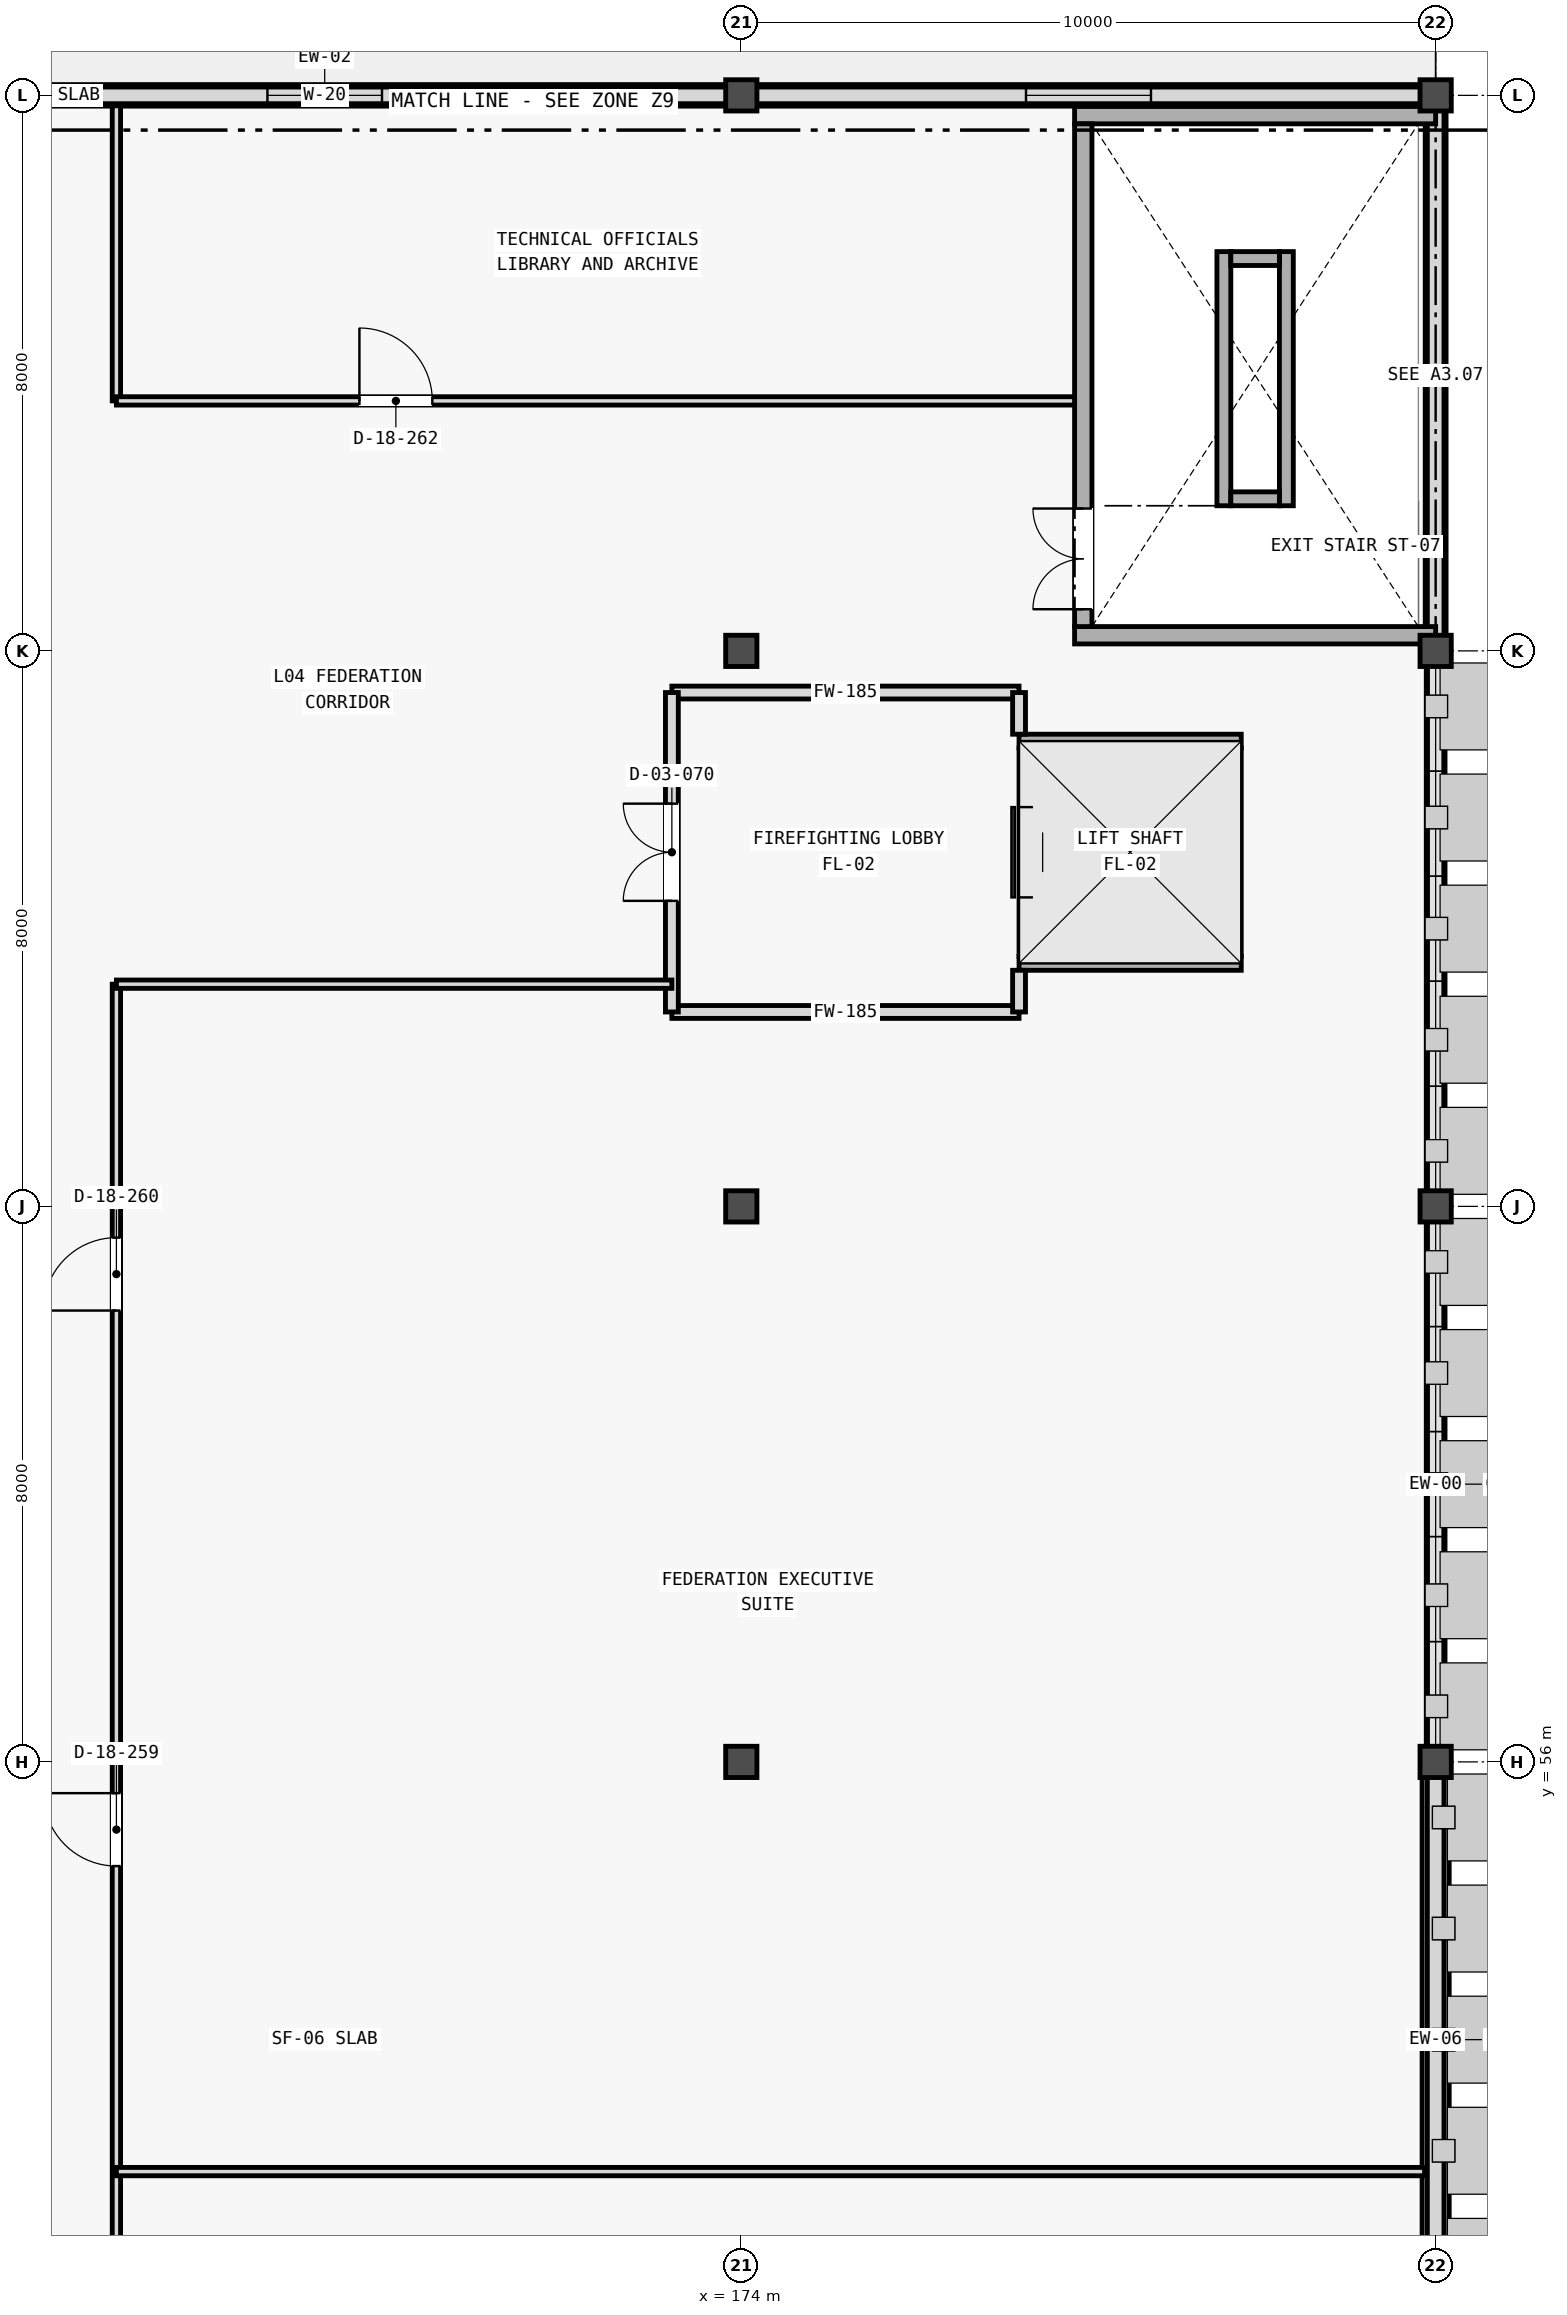
"""IFC4 building model, lengths in metres.
Left out: names, types, materials, properties, quantities, classifications, styles, units other than length and angle.
Written with IfcOpenShell. Run it as: python <this file> out.ifc"""

import sys

from ifc_helpers import new_model, si_unit, direction, frame, frame_2d, origin, origin_2d, place, context, subcontext, project, spatial, rectangle, extrude, element, fill, save


model = new_model("IFC4")
c1 = context("Model", 3, precision=1e-05, world=origin(), true_north=direction((0.0, 1.0)))
c2 = subcontext(c1, "Body", "Model", "MODEL_VIEW")
j1 = project(units=[si_unit("LENGTHUNIT", "METRE"), si_unit("PLANEANGLEUNIT", "RADIAN")], contexts=[c1])
p1 = place(None, origin())
s1 = spatial("IfcSite", under=j1, at=p1, CompositionType="ELEMENT")
p2 = place(p1, origin())
s2 = spatial("IfcBuilding", under=s1, at=p2, CompositionType="ELEMENT")
p3 = place(p2, frame((0.0, 0.0, 18.6)))
s3 = spatial("IfcBuildingStorey", under=s2, at=p3, CompositionType="ELEMENT", Elevation=18.6)
for number, where, z_axis, x_axis in (
    (1, (174.0, 56.0, 0.0), (0.0, 0.0, 1.0), (1.0, 0.0, 0.0)),
    (2, (184.0, 56.0, 0.0), (0.0, 0.0, 1.0), (1.0, 0.0, 0.0)),
    (3, (174.0, 64.0, 0.0), (0.0, 0.0, 1.0), (1.0, 0.0, 0.0)),
    (4, (184.0, 64.0, 0.0), (0.0, 0.0, 1.0), (1.0, 0.0, 0.0)),
    (5, (174.0, 72.0, 0.0), (0.0, 0.0, 1.0), (1.0, 0.0, 0.0)),
    (6, (184.0, 72.0, 0.0), (0.0, 0.0, 1.0), (1.0, 0.0, 0.0)),
    (7, (174.0, 80.0, 0.0), (0.0, 0.0, 1.0), (1.0, 0.0, 0.0)),
    (8, (184.0, 80.0, 0.0), (0.0, 0.0, 1.0), (1.0, 0.0, 0.0)),
):
    element("IfcColumn", number, at=place(p3, frame(where, z_axis=z_axis, x_axis=x_axis)), inside=s3, PredefinedType="COLUMN", context=c2, shape_type="SweptSolid", body=[
        extrude(rectangle(XDim=0.45, YDim=0.45, at=origin_2d()), origin(), (0.0, 0.0, 1.0), 3.985),
    ])
p4 = place(p3, frame((184.0, 48.221, 0.0), z_axis=(0.0, 0.0, 1.0), x_axis=(0.0, 1.0, 0.0)))
e9 = element("IfcWall", 9, at=p4, inside=s3, PredefinedType="STANDARD", context=c2, shape_type="SweptSolid", body=[
    extrude(rectangle(XDim=7.558, YDim=0.39, at=frame_2d((3.779, 0.0))), origin(), (0.0, 0.0, 1.0), 3.365),
])
for number, where, z_axis, x_axis in (
    (10, (184.0, 56.221, 0.0), (0.0, 0.0, 1.0), (0.0, 1.0, 0.0)),
    (11, (184.0, 64.221, 0.0), (0.0, 0.0, 1.0), (0.0, 1.0, 0.0)),
):
    element("IfcWall", number, at=place(p3, frame(where, z_axis=z_axis, x_axis=x_axis)), inside=s3, PredefinedType="STANDARD", context=c2, shape_type="SweptSolid", body=[
        extrude(rectangle(XDim=7.558, YDim=0.27, at=frame_2d((3.779, 0.0))), origin(), (0.0, 0.0, 1.0), 0.8),
    ])
p5 = place(p3, frame((184.0, 72.221, 0.0), z_axis=(0.0, 0.0, 1.0), x_axis=(0.0, 1.0, 0.0)))
e12 = element("IfcWall", 12, at=p5, inside=s3, PredefinedType="SHEAR", context=c2, shape_type="SweptSolid", body=[
    extrude(rectangle(XDim=7.558, YDim=0.3, at=frame_2d((3.779, 0.0))), origin(), (0.0, 0.0, 1.0), 3.985),
])
p6 = place(p3, frame((162.221, 80.0, 0.0), z_axis=(0.0, 0.0, 1.0), x_axis=(1.0, 0.0, 0.0)))
e13 = element("IfcWall", 13, at=p6, inside=s3, PredefinedType="STANDARD", context=c2, shape_type="SweptSolid", body=[
    extrude(rectangle(XDim=11.558, YDim=0.31, at=frame_2d((5.779, 0.0))), origin(), (0.0, 0.0, 1.0), 3.4),
])
p7 = place(p6, frame((4.954, 0.0, 0.95)))
e14 = element("IfcOpeningElement", 14, at=p7, cuts=e13, PredefinedType="OPENING", context=c2, shape_type="SweptSolid", body=[
    extrude(rectangle(XDim=1.65, YDim=1.7, at=frame_2d((0.825, 0.85))), frame((0.0, 0.165, 0.0), z_axis=(0.0, -1.0, 0.0), x_axis=(1.0, 0.0, 0.0)), (0.0, 0.0, 1.0), 0.33),
])
p8 = place(p3, frame((174.221, 80.0, 0.0), z_axis=(0.0, 0.0, 1.0), x_axis=(1.0, 0.0, 0.0)))
e15 = element("IfcWall", 15, at=p8, inside=s3, PredefinedType="STANDARD", context=c2, shape_type="SweptSolid", body=[
    extrude(rectangle(XDim=9.558, YDim=0.31, at=frame_2d((4.779, 0.0))), origin(), (0.0, 0.0, 1.0), 3.4),
])
p9 = place(p8, frame((3.879, 0.0, 0.95)))
e16 = element("IfcOpeningElement", 16, at=p9, cuts=e15, PredefinedType="OPENING", context=c2, shape_type="SweptSolid", body=[
    extrude(rectangle(XDim=1.8, YDim=1.8, at=frame_2d((0.9, 0.9))), frame((0.0, 0.165, 0.0), z_axis=(0.0, -1.0, 0.0), x_axis=(1.0, 0.0, 0.0)), (0.0, 0.0, 1.0), 0.33),
])
p10 = place(p3, frame((152.0, 80.0, 4.2), z_axis=(0.0, 0.0, 1.0), x_axis=(1.0, 0.0, 0.0)))
e17 = element("IfcWall", 17, at=p10, inside=s3, PredefinedType="PARAPET", context=c2, shape_type="SweptSolid", body=[
    extrude(rectangle(XDim=32.0, YDim=0.24, at=frame_2d((16.0, 0.0))), origin(), (0.0, 0.0, 1.0), 1.1),
])
p11 = place(p3, frame((184.0, 24.12, 4.2), z_axis=(0.0, 0.0, 1.0), x_axis=(0.0, 1.0, 0.0)))
e18 = element("IfcWall", 18, at=p11, inside=s3, PredefinedType="PARAPET", context=c2, shape_type="SweptSolid", body=[
    extrude(rectangle(XDim=55.76, YDim=0.24, at=frame_2d((27.88, 0.0))), origin(), (0.0, 0.0, 1.0), 1.1),
])
for number, where, z_axis, x_axis in (
    (19, (178.8, 72.225, 0.0), (0.0, 0.0, 1.0), (1.0, 0.0, 0.0)),
    (20, (178.8, 79.715, 0.0), (0.0, 0.0, 1.0), (1.0, 0.0, 0.0)),
):
    element("IfcWall", number, at=place(p3, frame(where, z_axis=z_axis, x_axis=x_axis)), inside=s3, PredefinedType="SHEAR", context=c2, shape_type="SweptSolid", body=[
        extrude(rectangle(XDim=5.2, YDim=0.25, at=frame_2d((2.6, 0.0))), origin(), (0.0, 0.0, 1.0), 3.985),
    ])
p12 = place(p3, frame((178.925, 72.35, 0.0), z_axis=(0.0, 0.0, 1.0), x_axis=(0.0, 1.0, 0.0)))
e21 = element("IfcWall", 21, at=p12, inside=s3, PredefinedType="SHEAR", context=c2, shape_type="SweptSolid", body=[
    extrude(rectangle(XDim=7.24, YDim=0.25, at=frame_2d((3.62, 0.0))), origin(), (0.0, 0.0, 1.0), 3.985),
])
p13 = place(p12, frame((0.25, 0.0, 0.0)))
e22 = element("IfcOpeningElement", 22, at=p13, cuts=e21, PredefinedType="OPENING", context=c2, shape_type="SweptSolid", body=[
    extrude(rectangle(XDim=1.45, YDim=2.2, at=frame_2d((0.725, 1.1))), frame((0.0, 0.135, 0.0), z_axis=(0.0, -1.0, 0.0), x_axis=(1.0, 0.0, 0.0)), (0.0, 0.0, 1.0), 0.27),
])
for number, where, z_axis, x_axis in (
    (23, (180.95, 74.09, 0.0), (0.0, 0.0, 1.0), (0.0, 1.0, 0.0)),
    (24, (181.85, 74.09, 0.0), (0.0, 0.0, 1.0), (0.0, 1.0, 0.0)),
):
    element("IfcWall", number, at=place(p3, frame(where, z_axis=z_axis, x_axis=x_axis)), inside=s3, PredefinedType="SHEAR", context=c2, shape_type="SweptSolid", body=[
        extrude(rectangle(XDim=3.66, YDim=0.2, at=frame_2d((1.83, 0.0))), origin(), (0.0, 0.0, 1.0), 3.985),
    ])
for number, where, z_axis, x_axis in (
    (25, (181.05, 74.19, 0.0), (0.0, 0.0, 1.0), (1.0, 0.0, 0.0)),
    (26, (181.05, 77.65, 0.0), (0.0, 0.0, 1.0), (1.0, 0.0, 0.0)),
):
    element("IfcWall", number, at=place(p3, frame(where, z_axis=z_axis, x_axis=x_axis)), inside=s3, PredefinedType="SHEAR", context=c2, shape_type="SweptSolid", body=[
        extrude(rectangle(XDim=0.7, YDim=0.2, at=frame_2d((0.35, 0.0))), origin(), (0.0, 0.0, 1.0), 3.985),
    ])
for number, where, z_axis, x_axis in (
    (27, (178.0, 67.5, 0.0), (0.0, 0.0, 1.0), (1.0, 0.0, 0.0)),
    (28, (178.0, 70.7, 0.0), (0.0, 0.0, 1.0), (1.0, 0.0, 0.0)),
):
    element("IfcWall", number, at=place(p3, frame(where, z_axis=z_axis, x_axis=x_axis)), inside=s3, PredefinedType="SHEAR", context=c2, shape_type="SweptSolid", body=[
        extrude(rectangle(XDim=3.2, YDim=0.2, at=frame_2d((1.6, 0.0))), origin(), (0.0, 0.0, 1.0), 3.985),
    ])
p14 = place(p3, frame((178.1, 67.6, 0.0), z_axis=(0.0, 0.0, 1.0), x_axis=(0.0, 1.0, 0.0)))
e29 = element("IfcWall", 29, at=p14, inside=s3, PredefinedType="SHEAR", context=c2, shape_type="SweptSolid", body=[
    extrude(rectangle(XDim=3.0, YDim=0.2, at=frame_2d((1.5, 0.0))), origin(), (0.0, 0.0, 1.0), 3.985),
])
p15 = place(p14, frame((0.85, 0.0, 0.0)))
e30 = element("IfcOpeningElement", 30, at=p15, cuts=e29, PredefinedType="OPENING", context=c2, shape_type="SweptSolid", body=[
    extrude(rectangle(XDim=1.3, YDim=2.3, at=frame_2d((0.65, 1.15))), frame((0.0, 0.11, 0.0), z_axis=(0.0, -1.0, 0.0), x_axis=(1.0, 0.0, 0.0)), (0.0, 0.0, 1.0), 0.22),
])
p16 = place(p3, frame((181.1, 67.6, 0.0), z_axis=(0.0, 0.0, 1.0), x_axis=(0.0, 1.0, 0.0)))
e31 = element("IfcWall", 31, at=p16, inside=s3, PredefinedType="SHEAR", context=c2, shape_type="SweptSolid", body=[
    extrude(rectangle(XDim=3.0, YDim=0.2, at=frame_2d((1.5, 0.0))), origin(), (0.0, 0.0, 1.0), 3.985),
])
for number, where, z_axis, x_axis in (
    (32, (178.0, 66.8, 0.0), (0.0, 0.0, 1.0), (-1.0, 0.0, 0.0)),
    (33, (173.0, 71.4, 0.0), (0.0, 0.0, 1.0), (1.0, 0.0, 0.0)),
):
    element("IfcWall", number, at=place(p3, frame(where, z_axis=z_axis, x_axis=x_axis)), inside=s3, PredefinedType="STANDARD", context=c2, shape_type="SweptSolid", body=[
        extrude(rectangle(XDim=5.0, YDim=0.185, at=frame_2d((2.5, 0.0))), origin(), (0.0, 0.0, 1.0), 3.365),
    ])
p17 = place(p3, frame((173.0, 66.8, 0.0), z_axis=(0.0, 0.0, 1.0), x_axis=(0.0, 1.0, 0.0)))
e34 = element("IfcWall", 34, at=p17, inside=s3, PredefinedType="STANDARD", context=c2, shape_type="SweptSolid", body=[
    extrude(rectangle(XDim=4.6, YDim=0.185, at=frame_2d((2.3, 0.0))), origin(), (0.0, 0.0, 1.0), 3.365),
])
p18 = place(p17, frame((1.6, 0.0, 0.0)))
e35 = element("IfcOpeningElement", 35, at=p18, cuts=e34, PredefinedType="OPENING", context=c2, shape_type="SweptSolid", body=[
    extrude(rectangle(XDim=1.4, YDim=2.2, at=frame_2d((0.7, 1.1))), frame((0.0, 0.103, 0.0), z_axis=(0.0, -1.0, 0.0), x_axis=(1.0, 0.0, 0.0)), (0.0, 0.0, 1.0), 0.205),
])
for number, where, z_axis, x_axis in (
    (36, (178.0, 66.8, 0.0), (0.0, 0.0, 1.0), (0.0, 1.0, 0.0)),
    (37, (178.0, 70.8, 0.0), (0.0, 0.0, 1.0), (0.0, 1.0, 0.0)),
):
    element("IfcWall", number, at=place(p3, frame(where, z_axis=z_axis, x_axis=x_axis)), inside=s3, PredefinedType="STANDARD", context=c2, shape_type="SweptSolid", body=[
        extrude(rectangle(XDim=0.6, YDim=0.185, at=frame_2d((0.3, 0.0))), origin(), (0.0, 0.0, 1.0), 3.365),
    ])
p19 = place(p3, frame((165.0, 35.4, 0.0), z_axis=(0.0, 0.0, 1.0), x_axis=(0.0, 1.0, 0.0)))
e38 = element("IfcWall", 38, at=p19, inside=s3, PredefinedType="PARTITIONING", context=c2, shape_type="SweptSolid", body=[
    extrude(rectangle(XDim=31.8, YDim=0.12, at=frame_2d((15.9, 0.0))), origin(), (0.0, 0.0, 1.0), 3.515),
])
p20 = place(p19, frame((3.1, 0.0, 0.0)))
e39 = element("IfcOpeningElement", 39, at=p20, cuts=e38, PredefinedType="OPENING", context=c2, shape_type="SweptSolid", body=[
    extrude(rectangle(XDim=1.05, YDim=2.2, at=frame_2d((0.525, 1.1))), frame((0.0, 0.07, 0.0), z_axis=(0.0, -1.0, 0.0), x_axis=(1.0, 0.0, 0.0)), (0.0, 0.0, 1.0), 0.14),
])
p21 = place(p19, frame((10.1, 0.0, 0.0)))
e40 = element("IfcOpeningElement", 40, at=p21, cuts=e38, PredefinedType="OPENING", context=c2, shape_type="SweptSolid", body=[
    extrude(rectangle(XDim=1.05, YDim=2.2, at=frame_2d((0.525, 1.1))), frame((0.0, 0.07, 0.0), z_axis=(0.0, -1.0, 0.0), x_axis=(1.0, 0.0, 0.0)), (0.0, 0.0, 1.0), 0.14),
])
p22 = place(p19, frame((19.1, 0.0, 0.0)))
e41 = element("IfcOpeningElement", 41, at=p22, cuts=e38, PredefinedType="OPENING", context=c2, shape_type="SweptSolid", body=[
    extrude(rectangle(XDim=1.05, YDim=2.2, at=frame_2d((0.525, 1.1))), frame((0.0, 0.07, 0.0), z_axis=(0.0, -1.0, 0.0), x_axis=(1.0, 0.0, 0.0)), (0.0, 0.0, 1.0), 0.14),
])
p23 = place(p19, frame((27.1, 0.0, 0.0)))
e42 = element("IfcOpeningElement", 42, at=p23, cuts=e38, PredefinedType="OPENING", context=c2, shape_type="SweptSolid", body=[
    extrude(rectangle(XDim=1.05, YDim=2.2, at=frame_2d((0.525, 1.1))), frame((0.0, 0.07, 0.0), z_axis=(0.0, -1.0, 0.0), x_axis=(1.0, 0.0, 0.0)), (0.0, 0.0, 1.0), 0.14),
])
p24 = place(p3, frame((165.0, 75.6, 0.0), z_axis=(0.0, 0.0, 1.0), x_axis=(0.0, 1.0, 0.0)))
e43 = element("IfcWall", 43, at=p24, inside=s3, PredefinedType="PARTITIONING", context=c2, shape_type="SweptSolid", body=[
    extrude(rectangle(XDim=4.25, YDim=0.12, at=frame_2d((2.125, 0.0))), origin(), (0.0, 0.0, 1.0), 3.515),
])
p25 = place(p3, frame((165.0, 67.2, 0.0), z_axis=(0.0, 0.0, 1.0), x_axis=(1.0, 0.0, 0.0)))
e44 = element("IfcWall", 44, at=p25, inside=s3, PredefinedType="PARTITIONING", context=c2, shape_type="SweptSolid", body=[
    extrude(rectangle(XDim=8.0, YDim=0.12, at=frame_2d((4.0, 0.0))), origin(), (0.0, 0.0, 1.0), 3.725),
])
p26 = place(p3, frame((165.0, 75.6, 0.0), z_axis=(0.0, 0.0, 1.0), x_axis=(1.0, 0.0, 0.0)))
e45 = element("IfcWall", 45, at=p26, inside=s3, PredefinedType="PARTITIONING", context=c2, shape_type="SweptSolid", body=[
    extrude(rectangle(XDim=13.8, YDim=0.12, at=frame_2d((6.9, 0.0))), origin(), (0.0, 0.0, 1.0), 3.365),
])
p27 = place(p26, frame((3.5, 0.0, 0.0)))
e46 = element("IfcOpeningElement", 46, at=p27, cuts=e45, PredefinedType="OPENING", context=c2, shape_type="SweptSolid", body=[
    extrude(rectangle(XDim=1.05, YDim=2.2, at=frame_2d((0.525, 1.1))), frame((0.0, 0.07, 0.0), z_axis=(0.0, -1.0, 0.0), x_axis=(1.0, 0.0, 0.0)), (0.0, 0.0, 1.0), 0.14),
])
p28 = place(p3, frame((165.0, 50.1, 0.0), z_axis=(0.0, 0.0, 1.0), x_axis=(1.0, 0.0, 0.0)))
e47 = element("IfcWall", 47, at=p28, inside=s3, PredefinedType="PARTITIONING", context=c2, shape_type="SweptSolid", body=[
    extrude(rectangle(XDim=18.84, YDim=0.12, at=frame_2d((9.42, 0.0))), origin(), (0.0, 0.0, 1.0), 3.365),
])
p29 = place(p7, origin())
e48 = element("IfcWindow", 48, at=p29, inside=s3, PartitioningType="SINGLE_PANEL", PredefinedType="WINDOW", context=c2, shape_type="SweptSolid", body=[
    extrude(rectangle(XDim=1.65, YDim=1.7, at=frame_2d((0.825, 0.85))), frame((0.0, 0.03, 0.0), z_axis=(0.0, -1.0, 0.0), x_axis=(1.0, 0.0, 0.0)), (0.0, 0.0, 1.0), 0.06),
])
fill(e14, e48)
p30 = place(p9, origin())
e49 = element("IfcWindow", 49, at=p30, inside=s3, PartitioningType="SINGLE_PANEL", PredefinedType="WINDOW", context=c2, shape_type="SweptSolid", body=[
    extrude(rectangle(XDim=1.8, YDim=1.8, at=frame_2d((0.9, 0.9))), frame((0.0, 0.03, 0.0), z_axis=(0.0, -1.0, 0.0), x_axis=(1.0, 0.0, 0.0)), (0.0, 0.0, 1.0), 0.06),
])
fill(e16, e49)
p31 = place(p13, origin())
e50 = element("IfcDoor", 50, at=p31, inside=s3, OperationType="DOUBLE_DOOR_SINGLE_SWING", PredefinedType="DOOR", context=c2, shape_type="SweptSolid", body=[
    extrude(rectangle(XDim=1.45, YDim=2.2, at=frame_2d((0.725, 1.1))), frame((0.0, 0.025, 0.0), z_axis=(0.0, -1.0, 0.0), x_axis=(1.0, 0.0, 0.0)), (0.0, 0.0, 1.0), 0.05),
])
fill(e22, e50)
p32 = place(p15, origin())
e51 = element("IfcDoor", 51, at=p32, inside=s3, OperationType="SLIDING_TO_RIGHT", PredefinedType="DOOR", context=c2, shape_type="SweptSolid", body=[
    extrude(rectangle(XDim=1.3, YDim=2.3, at=frame_2d((0.65, 1.15))), frame((0.0, 0.025, 0.0), z_axis=(0.0, -1.0, 0.0), x_axis=(1.0, 0.0, 0.0)), (0.0, 0.0, 1.0), 0.05),
])
fill(e30, e51)
p33 = place(p18, origin())
e52 = element("IfcDoor", 52, at=p33, inside=s3, OperationType="DOUBLE_DOOR_SINGLE_SWING", PredefinedType="DOOR", context=c2, shape_type="SweptSolid", body=[
    extrude(rectangle(XDim=1.4, YDim=2.2, at=frame_2d((0.7, 1.1))), frame((0.0, 0.025, 0.0), z_axis=(0.0, -1.0, 0.0), x_axis=(1.0, 0.0, 0.0)), (0.0, 0.0, 1.0), 0.05),
])
fill(e35, e52)
p34 = place(p22, origin())
e53 = element("IfcDoor", 53, at=p34, inside=s3, OperationType="SINGLE_SWING_RIGHT", PredefinedType="DOOR", context=c2, shape_type="SweptSolid", body=[
    extrude(rectangle(XDim=1.05, YDim=2.2, at=frame_2d((0.525, 1.1))), frame((0.0, 0.025, 0.0), z_axis=(0.0, -1.0, 0.0), x_axis=(1.0, 0.0, 0.0)), (0.0, 0.0, 1.0), 0.05),
])
fill(e41, e53)
p35 = place(p23, origin())
e54 = element("IfcDoor", 54, at=p35, inside=s3, OperationType="SINGLE_SWING_LEFT", PredefinedType="DOOR", context=c2, shape_type="SweptSolid", body=[
    extrude(rectangle(XDim=1.05, YDim=2.2, at=frame_2d((0.525, 1.1))), frame((0.0, 0.025, 0.0), z_axis=(0.0, -1.0, 0.0), x_axis=(1.0, 0.0, 0.0)), (0.0, 0.0, 1.0), 0.05),
])
fill(e42, e54)
p36 = place(p27, origin())
e55 = element("IfcDoor", 55, at=p36, inside=s3, OperationType="SINGLE_SWING_LEFT", PredefinedType="DOOR", context=c2, shape_type="SweptSolid", body=[
    extrude(rectangle(XDim=1.05, YDim=2.2, at=frame_2d((0.525, 1.1))), frame((0.0, 0.025, 0.0), z_axis=(0.0, -1.0, 0.0), x_axis=(1.0, 0.0, 0.0)), (0.0, 0.0, 1.0), 0.05),
])
fill(e46, e55)
save(model, sys.argv[1])
